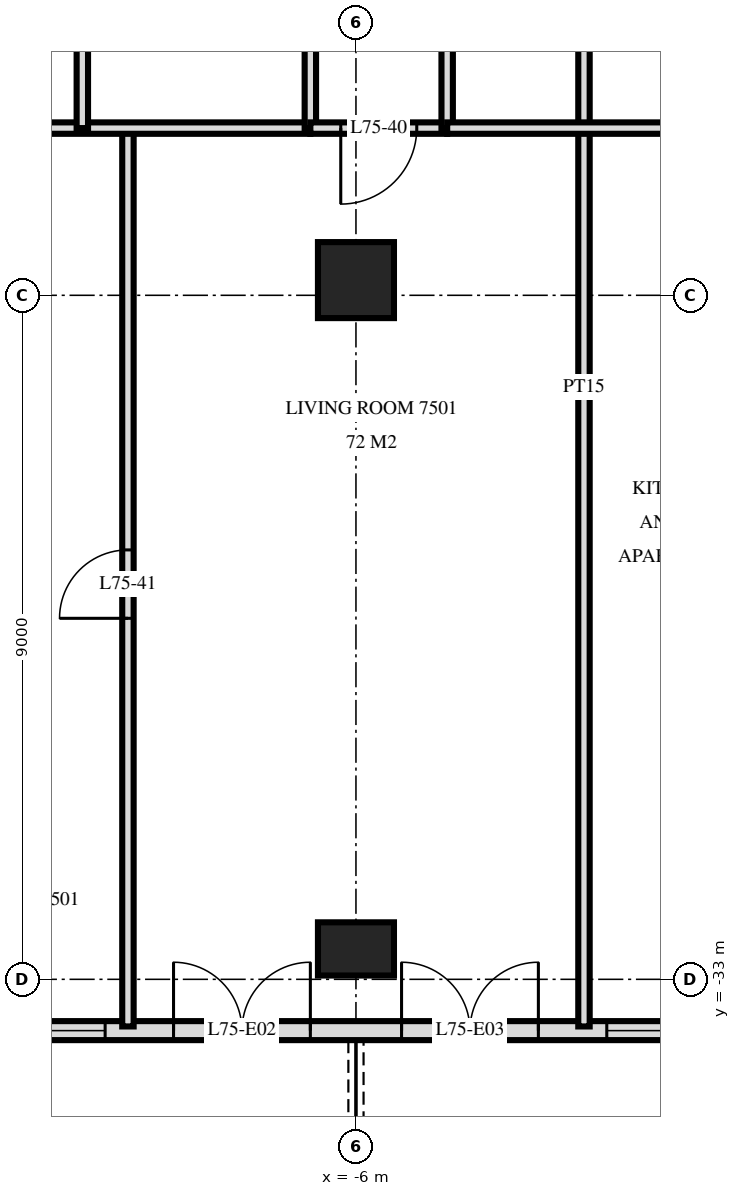
"""IFC4 building model, lengths in metres.
Left out: names, types, materials, properties, quantities, classifications, styles, units other than length and angle.
Written with IfcOpenShell. Run it as: python <this file> out.ifc"""

import sys

from ifc_helpers import new_model, si_unit, direction, frame, frame_2d, origin, origin_2d, place, context, subcontext, project, spatial, rectangle, extrude, element, fill, save


model = new_model("IFC4")
c1 = context("Model", 3, precision=1e-05, world=origin(), true_north=direction((0.0, 1.0)))
c2 = subcontext(c1, "Body", "Model", "MODEL_VIEW")
j1 = project(units=[si_unit("LENGTHUNIT", "METRE"), si_unit("PLANEANGLEUNIT", "RADIAN")], contexts=[c1])
p1 = place(None, origin())
s1 = spatial("IfcSite", under=j1, at=p1, CompositionType="ELEMENT")
p2 = place(p1, origin())
s2 = spatial("IfcBuilding", under=s1, at=p2, CompositionType="ELEMENT")
p3 = place(p2, frame((0.0, 0.0, 284.1)))
s3 = spatial("IfcBuildingStorey", under=s2, at=p3, CompositionType="ELEMENT", Elevation=284.1)
p4 = place(p3, frame((-6.0, -32.6, 0.0), z_axis=(0.0, 0.0, 1.0), x_axis=(1.0, 0.0, 0.0)))
e1 = element("IfcColumn", 1, at=p4, inside=s3, PredefinedType="COLUMN", context=c2, shape_type="SweptSolid", body=[
    extrude(rectangle(XDim=1.0, YDim=0.7, at=origin_2d()), origin(), (0.0, 0.0, 1.0), 3.5),
])
p5 = place(p3, frame((-6.0, -23.8, 0.0), z_axis=(0.0, 0.0, 1.0), x_axis=(1.0, 0.0, 0.0)))
e2 = element("IfcColumn", 2, at=p5, inside=s3, PredefinedType="COLUMN", context=c2, shape_type="SweptSolid", body=[
    extrude(rectangle(XDim=1.0, YDim=1.0, at=origin_2d()), origin(), (0.0, 0.0, 1.0), 3.5),
])
p6 = place(p3, frame((-18.575, -33.675, 0.0), z_axis=(0.0, 0.0, 1.0), x_axis=(1.0, 0.0, 0.0)))
e3 = element("IfcWall", 3, at=p6, inside=s3, PredefinedType="SOLIDWALL", context=c2, shape_type="SweptSolid", body=[
    extrude(rectangle(XDim=37.151, YDim=0.25, at=frame_2d((18.575, 0.0))), origin(), (0.0, 0.0, 1.0), 3.22),
])
p7 = place(p6, frame((1.175, 0.0, 0.0)))
e4 = element("IfcOpeningElement", 4, at=p7, cuts=e3, PredefinedType="OPENING", context=c2, shape_type="SweptSolid", body=[
    extrude(rectangle(XDim=1.8, YDim=2.4, at=frame_2d((0.9, 1.2))), frame((0.0, 0.135, 0.0), z_axis=(0.0, -1.0, 0.0), x_axis=(1.0, 0.0, 0.0)), (0.0, 0.0, 1.0), 0.27),
])
p8 = place(p6, frame((4.4, 0.0, 0.9)))
e5 = element("IfcOpeningElement", 5, at=p8, cuts=e3, PredefinedType="OPENING", context=c2, shape_type="SweptSolid", body=[
    extrude(rectangle(XDim=1.8, YDim=1.5, at=frame_2d((0.9, 0.75))), frame((0.0, 0.135, 0.0), z_axis=(0.0, -1.0, 0.0), x_axis=(1.0, 0.0, 0.0)), (0.0, 0.0, 1.0), 0.27),
])
p9 = place(p6, frame((6.875, 0.0, 0.9)))
e6 = element("IfcOpeningElement", 6, at=p9, cuts=e3, PredefinedType="OPENING", context=c2, shape_type="SweptSolid", body=[
    extrude(rectangle(XDim=2.4, YDim=1.5, at=frame_2d((1.2, 0.75))), frame((0.0, 0.135, 0.0), z_axis=(0.0, -1.0, 0.0), x_axis=(1.0, 0.0, 0.0)), (0.0, 0.0, 1.0), 0.27),
])
p10 = place(p6, frame((10.175, 0.0, 0.0)))
e7 = element("IfcOpeningElement", 7, at=p10, cuts=e3, PredefinedType="OPENING", context=c2, shape_type="SweptSolid", body=[
    extrude(rectangle(XDim=1.8, YDim=2.4, at=frame_2d((0.9, 1.2))), frame((0.0, 0.135, 0.0), z_axis=(0.0, -1.0, 0.0), x_axis=(1.0, 0.0, 0.0)), (0.0, 0.0, 1.0), 0.27),
])
p11 = place(p6, frame((13.175, 0.0, 0.0)))
e8 = element("IfcOpeningElement", 8, at=p11, cuts=e3, PredefinedType="OPENING", context=c2, shape_type="SweptSolid", body=[
    extrude(rectangle(XDim=1.8, YDim=2.4, at=frame_2d((0.9, 1.2))), frame((0.0, 0.135, 0.0), z_axis=(0.0, -1.0, 0.0), x_axis=(1.0, 0.0, 0.0)), (0.0, 0.0, 1.0), 0.27),
])
p12 = place(p6, frame((15.875, 0.0, 0.9)))
e9 = element("IfcOpeningElement", 9, at=p12, cuts=e3, PredefinedType="OPENING", context=c2, shape_type="SweptSolid", body=[
    extrude(rectangle(XDim=2.4, YDim=1.5, at=frame_2d((1.2, 0.75))), frame((0.0, 0.135, 0.0), z_axis=(0.0, -1.0, 0.0), x_axis=(1.0, 0.0, 0.0)), (0.0, 0.0, 1.0), 0.27),
])
p13 = place(p6, frame((19.175, 0.0, 0.0)))
e10 = element("IfcOpeningElement", 10, at=p13, cuts=e3, PredefinedType="OPENING", context=c2, shape_type="SweptSolid", body=[
    extrude(rectangle(XDim=1.8, YDim=2.4, at=frame_2d((0.9, 1.2))), frame((0.0, 0.135, 0.0), z_axis=(0.0, -1.0, 0.0), x_axis=(1.0, 0.0, 0.0)), (0.0, 0.0, 1.0), 0.27),
])
p14 = place(p6, frame((21.875, 0.0, 0.9)))
e11 = element("IfcOpeningElement", 11, at=p14, cuts=e3, PredefinedType="OPENING", context=c2, shape_type="SweptSolid", body=[
    extrude(rectangle(XDim=2.4, YDim=1.5, at=frame_2d((1.2, 0.75))), frame((0.0, 0.135, 0.0), z_axis=(0.0, -1.0, 0.0), x_axis=(1.0, 0.0, 0.0)), (0.0, 0.0, 1.0), 0.27),
])
p15 = place(p6, frame((25.063, 0.0, 0.9)))
e12 = element("IfcOpeningElement", 12, at=p15, cuts=e3, PredefinedType="OPENING", context=c2, shape_type="SweptSolid", body=[
    extrude(rectangle(XDim=1.8, YDim=1.5, at=frame_2d((0.9, 0.75))), frame((0.0, 0.135, 0.0), z_axis=(0.0, -1.0, 0.0), x_axis=(1.0, 0.0, 0.0)), (0.0, 0.0, 1.0), 0.27),
])
p16 = place(p6, frame((27.838, 0.0, 0.0)))
e13 = element("IfcOpeningElement", 13, at=p16, cuts=e3, PredefinedType="OPENING", context=c2, shape_type="SweptSolid", body=[
    extrude(rectangle(XDim=1.8, YDim=2.4, at=frame_2d((0.9, 1.2))), frame((0.0, 0.135, 0.0), z_axis=(0.0, -1.0, 0.0), x_axis=(1.0, 0.0, 0.0)), (0.0, 0.0, 1.0), 0.27),
])
p17 = place(p6, frame((31.175, 0.0, 0.0)))
e14 = element("IfcOpeningElement", 14, at=p17, cuts=e3, PredefinedType="OPENING", context=c2, shape_type="SweptSolid", body=[
    extrude(rectangle(XDim=1.8, YDim=2.4, at=frame_2d((0.9, 1.2))), frame((0.0, 0.135, 0.0), z_axis=(0.0, -1.0, 0.0), x_axis=(1.0, 0.0, 0.0)), (0.0, 0.0, 1.0), 0.27),
])
p18 = place(p3, frame((-3.0, -33.62, 0.0), z_axis=(0.0, 0.0, 1.0), x_axis=(0.0, 1.0, 0.0)))
e15 = element("IfcWall", 15, at=p18, inside=s3, PredefinedType="PARTITIONING", context=c2, shape_type="SweptSolid", body=[
    extrude(rectangle(XDim=16.82, YDim=0.15, at=frame_2d((8.41, 0.0))), origin(), (0.0, 0.0, 1.0), 3.22),
])
p19 = place(p3, frame((-4.8, -21.8, 0.0), z_axis=(0.0, 0.0, 1.0), x_axis=(0.0, 1.0, 0.0)))
e16 = element("IfcWall", 16, at=p19, inside=s3, PredefinedType="PARTITIONING", context=c2, shape_type="SweptSolid", body=[
    extrude(rectangle(XDim=5.0, YDim=0.15, at=frame_2d((2.5, 0.0))), origin(), (0.0, 0.0, 1.0), 3.22),
])
p20 = place(p3, frame((-6.6, -21.8, 0.0), z_axis=(0.0, 0.0, 1.0), x_axis=(0.0, 1.0, 0.0)))
e17 = element("IfcWall", 17, at=p20, inside=s3, PredefinedType="PARTITIONING", context=c2, shape_type="SweptSolid", body=[
    extrude(rectangle(XDim=5.0, YDim=0.15, at=frame_2d((2.5, 0.0))), origin(), (0.0, 0.0, 1.0), 3.22),
])
p21 = place(p20, frame((2.0, 0.0, 0.0)))
e18 = element("IfcOpeningElement", 18, at=p21, cuts=e17, PredefinedType="OPENING", context=c2, shape_type="SweptSolid", body=[
    extrude(rectangle(XDim=1.0, YDim=2.1, at=frame_2d((0.5, 1.05))), frame((0.0, 0.085, 0.0), z_axis=(0.0, -1.0, 0.0), x_axis=(1.0, 0.0, 0.0)), (0.0, 0.0, 1.0), 0.17),
])
p22 = place(p3, frame((-9.0, -33.62, 0.0), z_axis=(0.0, 0.0, 1.0), x_axis=(0.0, 1.0, 0.0)))
e19 = element("IfcWall", 19, at=p22, inside=s3, PredefinedType="PARTITIONING", context=c2, shape_type="SweptSolid", body=[
    extrude(rectangle(XDim=11.82, YDim=0.15, at=frame_2d((5.91, 0.0))), origin(), (0.0, 0.0, 1.0), 3.22),
])
p23 = place(p22, frame((5.37, 0.0, 0.0)))
e20 = element("IfcOpeningElement", 20, at=p23, cuts=e19, PredefinedType="OPENING", context=c2, shape_type="SweptSolid", body=[
    extrude(rectangle(XDim=0.9, YDim=2.1, at=frame_2d((0.45, 1.05))), frame((0.0, 0.085, 0.0), z_axis=(0.0, -1.0, 0.0), x_axis=(1.0, 0.0, 0.0)), (0.0, 0.0, 1.0), 0.17),
])
p24 = place(p3, frame((-9.6, -21.8, 0.0), z_axis=(0.0, 0.0, 1.0), x_axis=(0.0, 1.0, 0.0)))
e21 = element("IfcWall", 21, at=p24, inside=s3, PredefinedType="PARTITIONING", context=c2, shape_type="SweptSolid", body=[
    extrude(rectangle(XDim=5.0, YDim=0.15, at=frame_2d((2.5, 0.0))), origin(), (0.0, 0.0, 1.0), 3.22),
])
p25 = place(p3, frame((-6.6, -21.8, 0.0), z_axis=(0.0, 0.0, 1.0), x_axis=(1.0, 0.0, 0.0)))
e22 = element("IfcWall", 22, at=p25, inside=s3, PredefinedType="PARTITIONING", context=c2, shape_type="SweptSolid", body=[
    extrude(rectangle(XDim=1.8, YDim=0.15, at=frame_2d((0.9, 0.0))), origin(), (0.0, 0.0, 1.0), 3.22),
])
p26 = place(p25, frame((0.4, 0.0, 0.0)))
e23 = element("IfcOpeningElement", 23, at=p26, cuts=e22, PredefinedType="OPENING", context=c2, shape_type="SweptSolid", body=[
    extrude(rectangle(XDim=1.0, YDim=2.1, at=frame_2d((0.5, 1.05))), frame((0.0, 0.085, 0.0), z_axis=(0.0, -1.0, 0.0), x_axis=(1.0, 0.0, 0.0)), (0.0, 0.0, 1.0), 0.17),
])
p27 = place(p3, frame((-12.0, -21.8, 0.0), z_axis=(0.0, 0.0, 1.0), x_axis=(1.0, 0.0, 0.0)))
e24 = element("IfcWall", 24, at=p27, inside=s3, PredefinedType="PARTITIONING", context=c2, shape_type="SweptSolid", body=[
    extrude(rectangle(XDim=5.4, YDim=0.15, at=frame_2d((2.7, 0.0))), origin(), (0.0, 0.0, 1.0), 3.22),
])
p28 = place(p27, frame((0.8, 0.0, 0.0)))
e25 = element("IfcOpeningElement", 25, at=p28, cuts=e24, PredefinedType="OPENING", context=c2, shape_type="SweptSolid", body=[
    extrude(rectangle(XDim=0.8, YDim=2.1, at=frame_2d((0.4, 1.05))), frame((0.0, 0.085, 0.0), z_axis=(0.0, -1.0, 0.0), x_axis=(1.0, 0.0, 0.0)), (0.0, 0.0, 1.0), 0.17),
])
p29 = place(p3, frame((-4.8, -21.8, 0.0), z_axis=(0.0, 0.0, 1.0), x_axis=(1.0, 0.0, 0.0)))
e26 = element("IfcWall", 26, at=p29, inside=s3, PredefinedType="PARTITIONING", context=c2, shape_type="SweptSolid", body=[
    extrude(rectangle(XDim=3.5, YDim=0.15, at=frame_2d((1.75, 0.0))), origin(), (0.0, 0.0, 1.0), 3.22),
])
p30 = place(p9, origin())
e27 = element("IfcWindow", 27, at=p30, inside=s3, PartitioningType="SINGLE_PANEL", PredefinedType="WINDOW", context=c2, shape_type="SweptSolid", body=[
    extrude(rectangle(XDim=2.4, YDim=1.5, at=frame_2d((1.2, 0.75))), frame((0.0, 0.03, 0.0), z_axis=(0.0, -1.0, 0.0), x_axis=(1.0, 0.0, 0.0)), (0.0, 0.0, 1.0), 0.06),
])
fill(e6, e27)
p31 = place(p10, origin())
e28 = element("IfcDoor", 28, at=p31, inside=s3, OperationType="DOUBLE_DOOR_SINGLE_SWING", PredefinedType="DOOR", context=c2, shape_type="SweptSolid", body=[
    extrude(rectangle(XDim=1.8, YDim=2.4, at=frame_2d((0.9, 1.2))), frame((0.0, 0.025, 0.0), z_axis=(0.0, -1.0, 0.0), x_axis=(1.0, 0.0, 0.0)), (0.0, 0.0, 1.0), 0.05),
])
fill(e7, e28)
p32 = place(p11, origin())
e29 = element("IfcDoor", 29, at=p32, inside=s3, OperationType="DOUBLE_DOOR_SINGLE_SWING", PredefinedType="DOOR", context=c2, shape_type="SweptSolid", body=[
    extrude(rectangle(XDim=1.8, YDim=2.4, at=frame_2d((0.9, 1.2))), frame((0.0, 0.025, 0.0), z_axis=(0.0, -1.0, 0.0), x_axis=(1.0, 0.0, 0.0)), (0.0, 0.0, 1.0), 0.05),
])
fill(e8, e29)
p33 = place(p12, origin())
e30 = element("IfcWindow", 30, at=p33, inside=s3, PartitioningType="SINGLE_PANEL", PredefinedType="WINDOW", context=c2, shape_type="SweptSolid", body=[
    extrude(rectangle(XDim=2.4, YDim=1.5, at=frame_2d((1.2, 0.75))), frame((0.0, 0.03, 0.0), z_axis=(0.0, -1.0, 0.0), x_axis=(1.0, 0.0, 0.0)), (0.0, 0.0, 1.0), 0.06),
])
fill(e9, e30)
p34 = place(p26, frame((0.5, 0.0, 0.0), z_axis=(0.0, 0.0, 1.0), x_axis=(-1.0, 0.0, 0.0)))
e31 = element("IfcDoor", 31, at=p34, inside=s3, OperationType="SINGLE_SWING_LEFT", PredefinedType="DOOR", context=c2, shape_type="SweptSolid", body=[
    extrude(rectangle(XDim=1.0, YDim=2.1, at=frame_2d((0.0, 1.05))), frame((0.0, -0.025, 0.0), z_axis=(0.0, 1.0, 0.0), x_axis=(-1.0, 0.0, 0.0)), (0.0, 0.0, 1.0), 0.05),
])
fill(e23, e31)
p35 = place(p23, origin())
e32 = element("IfcDoor", 32, at=p35, inside=s3, OperationType="SINGLE_SWING_RIGHT", PredefinedType="DOOR", context=c2, shape_type="SweptSolid", body=[
    extrude(rectangle(XDim=0.9, YDim=2.1, at=frame_2d((0.45, 1.05))), frame((0.0, 0.025, 0.0), z_axis=(0.0, -1.0, 0.0), x_axis=(1.0, 0.0, 0.0)), (0.0, 0.0, 1.0), 0.05),
])
fill(e20, e32)
save(model, sys.argv[1])
